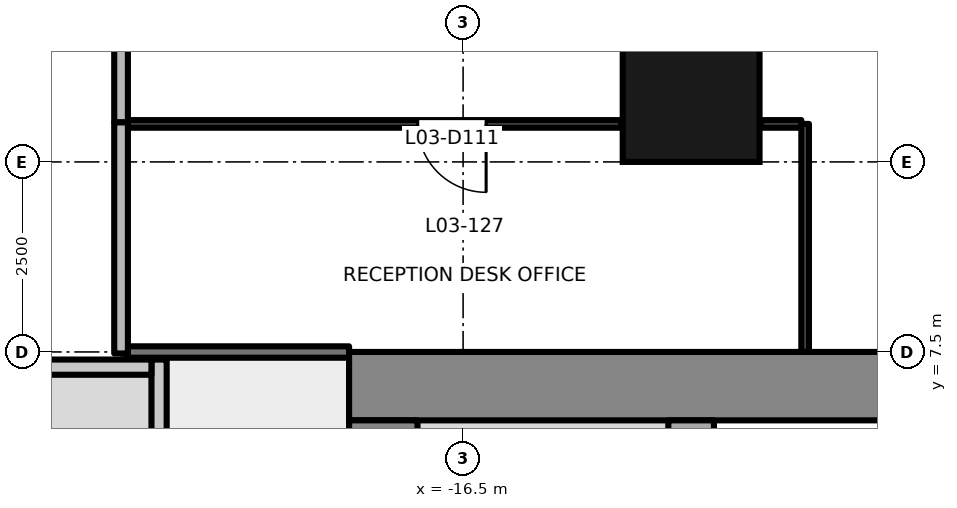
"""IFC4 building model, lengths in metres.
Left out: names, types, materials, properties, quantities, classifications, styles, units other than length and angle.
Written with IfcOpenShell. Run it as: python <this file> out.ifc"""

import sys

from ifc_helpers import new_model, si_unit, direction, frame, frame_2d, origin, origin_2d, place, context, subcontext, project, spatial, rectangle, extrude, element, fill, save


model = new_model("IFC4")
c1 = context("Model", 3, precision=1e-05, world=origin(), true_north=direction((0.0, 1.0)))
c2 = subcontext(c1, "Body", "Model", "MODEL_VIEW")
j1 = project(units=[si_unit("LENGTHUNIT", "METRE"), si_unit("PLANEANGLEUNIT", "RADIAN")], contexts=[c1])
p1 = place(None, origin())
s1 = spatial("IfcSite", under=j1, at=p1, CompositionType="ELEMENT")
p2 = place(p1, origin())
s2 = spatial("IfcBuilding", under=s1, at=p2, CompositionType="ELEMENT")
p3 = place(p2, frame((0.0, 0.0, 17.4)))
s3 = spatial("IfcBuildingStorey", under=s2, at=p3, CompositionType="ELEMENT", Elevation=17.4)
p4 = place(p3, frame((-13.5, 10.9, -0.2), z_axis=(0.0, 0.0, 1.0), x_axis=(1.0, 0.0, 0.0)))
e1 = element("IfcColumn", 1, at=p4, inside=s3, PredefinedType="COLUMN", context=c2, shape_type="SweptSolid", body=[
    extrude(rectangle(XDim=1.8, YDim=1.8, at=origin_2d()), origin(), (0.0, 0.0, 1.0), 4.8),
])
p5 = place(p3, frame((-18.0, 7.05, -0.2), z_axis=(0.0, 0.0, 1.0), x_axis=(1.0, 0.0, 0.0)))
e2 = element("IfcWall", 2, at=p5, inside=s3, PredefinedType="SHEAR", context=c2, shape_type="SweptSolid", body=[
    extrude(rectangle(XDim=36.0, YDim=0.9, at=frame_2d((18.0, 0.0))), origin(), (0.0, 0.0, 1.0), 4.8),
])
p6 = place(p3, frame((-17.55, -6.6, -0.2), z_axis=(0.0, 0.0, 1.0), x_axis=(0.0, 1.0, 0.0)))
e3 = element("IfcWall", 3, at=p6, inside=s3, PredefinedType="SHEAR", context=c2, shape_type="SweptSolid", body=[
    extrude(rectangle(XDim=13.2, YDim=0.9, at=frame_2d((6.6, 0.0))), origin(), (0.0, 0.0, 1.0), 4.8),
])
p7 = place(p6, frame((4.55, 0.0, 0.2)))
e4 = element("IfcOpeningElement", 4, at=p7, cuts=e3, PredefinedType="OPENING", context=c2, shape_type="SweptSolid", body=[
    extrude(rectangle(XDim=1.2, YDim=2.1, at=frame_2d((0.6, 1.05))), frame((0.0, 0.46, 0.0), z_axis=(0.0, -1.0, 0.0), x_axis=(1.0, 0.0, 0.0)), (0.0, 0.0, 1.0), 0.921),
])
p8 = place(p3, frame((-13.5, -6.6, -0.2), z_axis=(0.0, 0.0, 1.0), x_axis=(0.0, 1.0, 0.0)))
e5 = element("IfcWall", 5, at=p8, inside=s3, PredefinedType="SHEAR", context=c2, shape_type="SweptSolid", body=[
    extrude(rectangle(XDim=13.2, YDim=0.6, at=frame_2d((6.6, 0.0))), origin(), (0.0, 0.0, 1.0), 4.8),
])
p9 = place(p3, frame((-20.5, 7.4, -0.2), z_axis=(0.0, 0.0, 1.0), x_axis=(0.0, -1.0, 0.0)))
e6 = element("IfcWall", 6, at=p9, inside=s3, PredefinedType="SHEAR", context=c2, shape_type="SweptSolid", body=[
    extrude(rectangle(XDim=7.4, YDim=0.2, at=frame_2d((3.7, 0.0))), origin(), (0.0, 0.0, 1.0), 4.8),
])
p10 = place(p9, frame((5.375, 0.0, 0.2)))
e7 = element("IfcOpeningElement", 7, at=p10, cuts=e6, PredefinedType="OPENING", context=c2, shape_type="SweptSolid", body=[
    extrude(rectangle(XDim=1.8, YDim=2.1, at=frame_2d((0.9, 1.05))), frame((0.0, 0.111, 0.0), z_axis=(0.0, -1.0, 0.0), x_axis=(1.0, 0.0, 0.0)), (0.0, 0.0, 1.0), 0.221),
])
p11 = place(p3, frame((-25.1, 7.3, -0.2), z_axis=(0.0, 0.0, 1.0), x_axis=(1.0, 0.0, 0.0)))
e8 = element("IfcWall", 8, at=p11, inside=s3, PredefinedType="SHEAR", context=c2, shape_type="SweptSolid", body=[
    extrude(rectangle(XDim=4.5, YDim=0.2, at=frame_2d((2.25, 0.0))), origin(), (0.0, 0.0, 1.0), 4.8),
])
p12 = place(p3, frame((-20.91, 7.499, 0.0), z_axis=(0.0, 0.0, 1.0), x_axis=(1.0, 0.0, 0.0)))
e9 = element("IfcWall", 9, at=p12, inside=s3, PredefinedType="PARTITIONING", context=c2, shape_type="SweptSolid", body=[
    extrude(rectangle(XDim=2.91, YDim=0.15, at=frame_2d((1.455, 0.0))), origin(), (0.0, 0.0, 1.0), 4.3),
])
p13 = place(p3, frame((-21.0, 11.99, 0.0), z_axis=(0.0, 0.0, 1.0), x_axis=(0.0, -1.0, 0.0)))
e10 = element("IfcWall", 10, at=p13, inside=s3, PredefinedType="PARTITIONING", context=c2, shape_type="SweptSolid", body=[
    extrude(rectangle(XDim=1.47, YDim=0.18, at=frame_2d((0.735, 0.0))), origin(), (0.0, 0.0, 1.0), 3.6),
])
p14 = place(p3, frame((-21.0, 10.52, 0.0), z_axis=(0.0, 0.0, 1.0), x_axis=(0.0, -1.0, 0.0)))
e11 = element("IfcWall", 11, at=p14, inside=s3, PredefinedType="PARTITIONING", context=c2, shape_type="SweptSolid", body=[
    extrude(rectangle(XDim=3.04, YDim=0.18, at=frame_2d((1.52, 0.0))), origin(), (0.0, 0.0, 1.0), 4.6),
])
p15 = place(p3, frame((-14.42, 10.5, 0.0), z_axis=(0.0, 0.0, 1.0), x_axis=(-1.0, 0.0, 0.0)))
e12 = element("IfcWall", 12, at=p15, inside=s3, PredefinedType="PARTITIONING", context=c2, shape_type="SweptSolid", body=[
    extrude(rectangle(XDim=6.49, YDim=0.1, at=frame_2d((3.245, 0.0))), origin(), (0.0, 0.0, 1.0), 4.3),
])
p16 = place(p15, frame((1.777, 0.0, 0.0)))
e13 = element("IfcOpeningElement", 13, at=p16, cuts=e12, PredefinedType="OPENING", context=c2, shape_type="SweptSolid", body=[
    extrude(rectangle(XDim=0.9, YDim=2.1, at=frame_2d((0.45, 1.05))), frame((0.0, 0.061, 0.0), z_axis=(0.0, -1.0, 0.0), x_axis=(1.0, 0.0, 0.0)), (0.0, 0.0, 1.0), 0.121),
])
p17 = place(p3, frame((-12.05, 10.5, 0.0), z_axis=(0.0, 0.0, 1.0), x_axis=(-1.0, 0.0, 0.0)))
e14 = element("IfcWall", 14, at=p17, inside=s3, PredefinedType="PARTITIONING", context=c2, shape_type="SweptSolid", body=[
    extrude(rectangle(XDim=0.53, YDim=0.1, at=frame_2d((0.265, 0.0))), origin(), (0.0, 0.0, 1.0), 4.6),
])
p18 = place(p3, frame((-12.0, 7.5, 0.0), z_axis=(0.0, 0.0, 1.0), x_axis=(0.0, 1.0, 0.0)))
e15 = element("IfcWall", 15, at=p18, inside=s3, PredefinedType="PARTITIONING", context=c2, shape_type="SweptSolid", body=[
    extrude(rectangle(XDim=3.0, YDim=0.1, at=frame_2d((1.5, 0.0))), origin(), (0.0, 0.0, 1.0), 4.6),
])
p19 = place(p16, origin())
e16 = element("IfcDoor", 16, at=p19, inside=s3, OperationType="SINGLE_SWING_LEFT", PredefinedType="DOOR", context=c2, shape_type="SweptSolid", body=[
    extrude(rectangle(XDim=0.9, YDim=2.1, at=frame_2d((0.45, 1.05))), frame((0.0, 0.025, 0.0), z_axis=(0.0, -1.0, 0.0), x_axis=(1.0, 0.0, 0.0)), (0.0, 0.0, 1.0), 0.05),
])
fill(e13, e16)
save(model, sys.argv[1])
